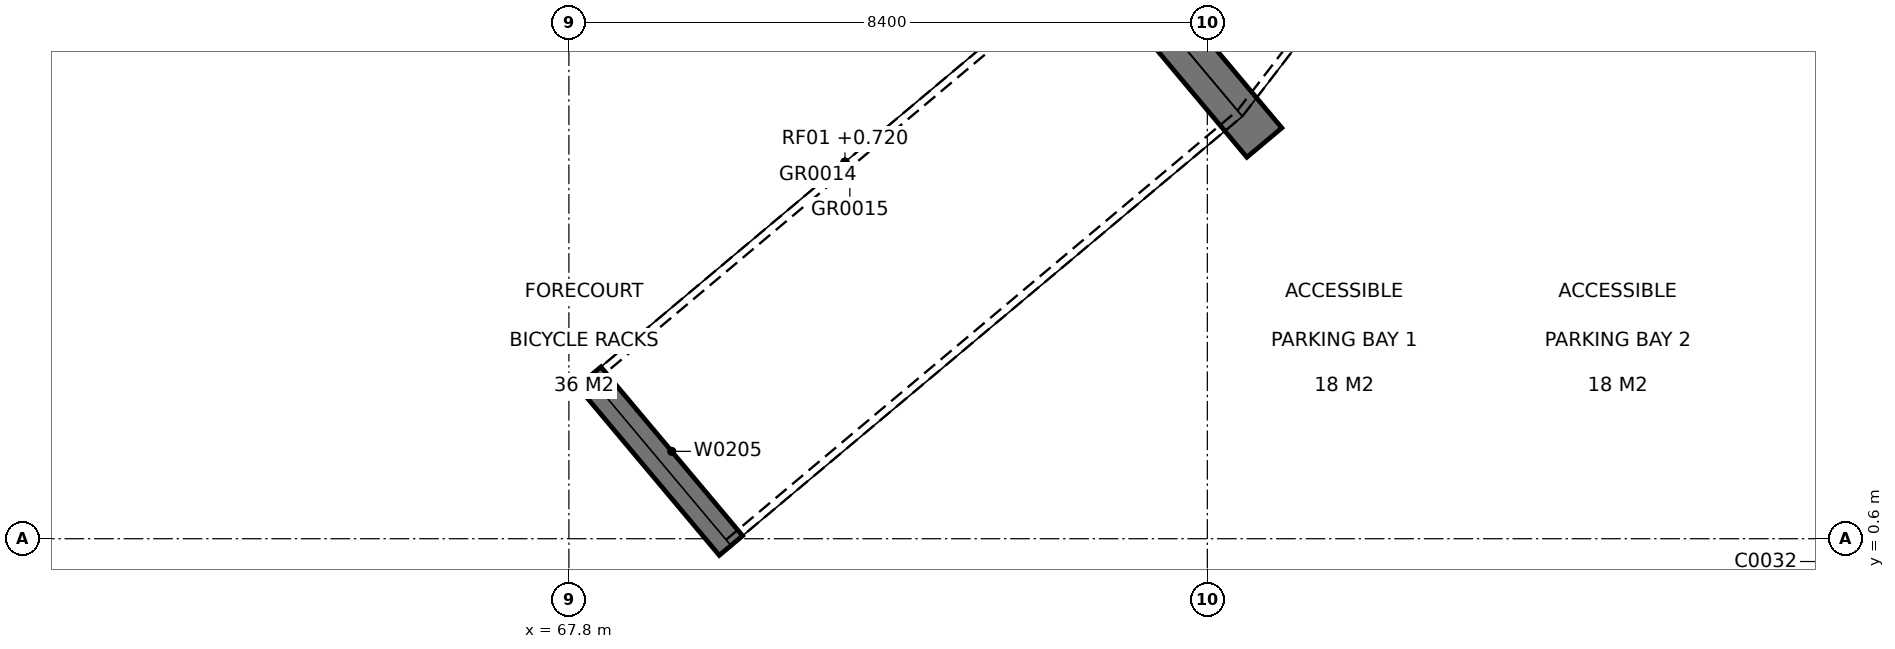
"""IFC4 building model, lengths in metres.
Left out: names, types, materials, properties, quantities, classifications, styles, units other than length and angle.
Written with IfcOpenShell. Run it as: python <this file> out.ifc"""

import sys

from ifc_helpers import new_model, si_unit, direction, frame, frame_2d, origin, place, context, subcontext, project, spatial, rectangle, extrude, element, save


model = new_model("IFC4")
c1 = context("Model", 3, precision=1e-05, world=origin(), true_north=direction((0.0, 1.0)))
c2 = subcontext(c1, "Body", "Model", "MODEL_VIEW")
j1 = project(units=[si_unit("LENGTHUNIT", "METRE"), si_unit("PLANEANGLEUNIT", "RADIAN")], contexts=[c1])
p1 = place(None, origin())
s1 = spatial("IfcSite", under=j1, at=p1, CompositionType="ELEMENT")
p2 = place(p1, origin())
s2 = spatial("IfcBuilding", under=s1, at=p2, CompositionType="ELEMENT")
p3 = place(p2, origin())
s3 = spatial("IfcBuildingStorey", under=s2, at=p3, CompositionType="ELEMENT", Elevation=0.0)
p4 = place(p3, frame((76.95, 5.812, -0.85), z_axis=(0.0, 0.0, 1.0), x_axis=(-0.642733920245, 0.766089490704, 0.0)))
e1 = element("IfcWall", 1, at=p4, inside=s3, PredefinedType="SOLIDWALL", context=c2, shape_type="SweptSolid", body=[
    extrude(rectangle(XDim=3.8, YDim=0.6, at=frame_2d((1.9, 0.0))), origin(), (0.0, 0.0, 1.0), 1.32),
])
p5 = place(p3, frame((69.932, 0.51, -0.85), z_axis=(0.0, 0.0, 1.0), x_axis=(-0.642797161196, 0.76603642835, 0.0)))
e2 = element("IfcWall", 2, at=p5, inside=s3, PredefinedType="SOLIDWALL", context=c2, shape_type="SweptSolid", body=[
    extrude(rectangle(XDim=2.9, YDim=0.4, at=frame_2d((1.45, 0.0))), origin(), (0.0, 0.0, 1.0), 0.6),
])
save(model, sys.argv[1])
